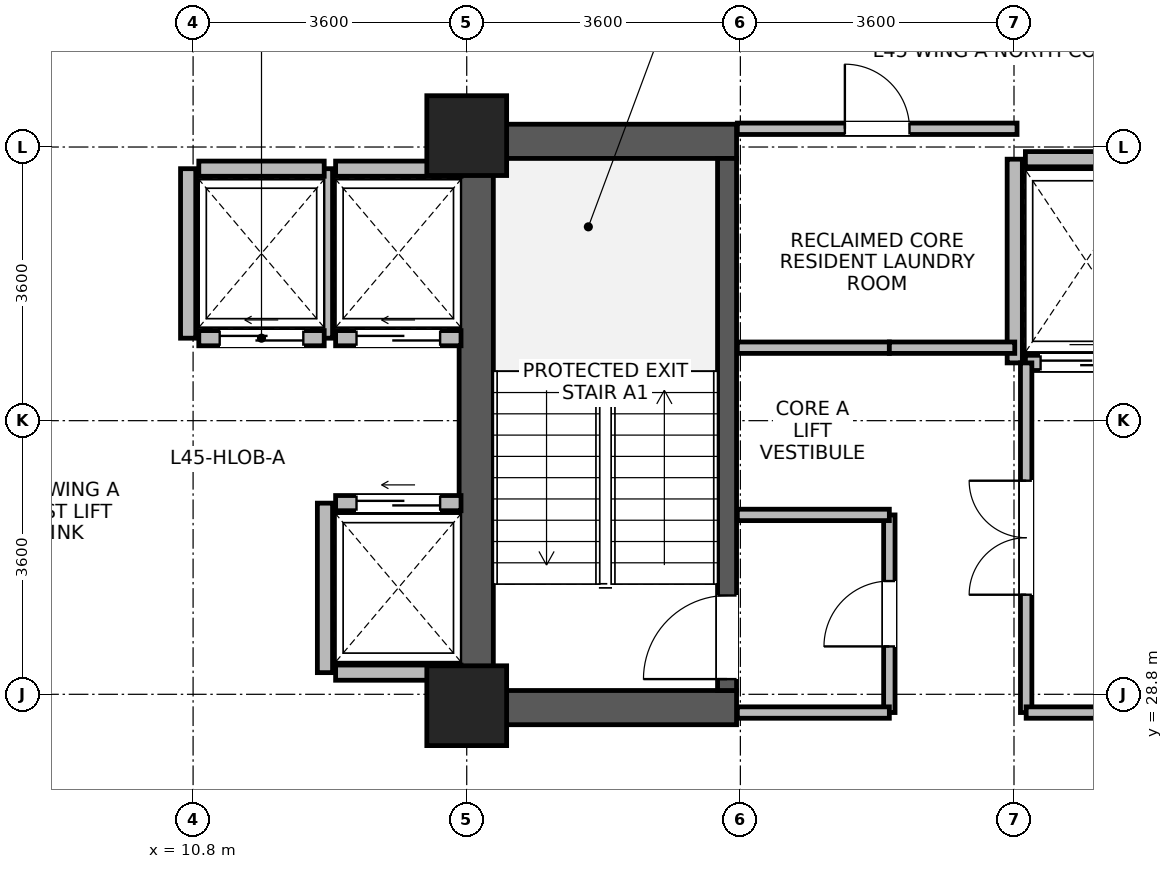
"""IFC4 building model, lengths in metres.
Left out: names, types, materials, properties, quantities, classifications, styles, units other than length and angle.
Written with IfcOpenShell. Run it as: python <this file> out.ifc"""

import sys

from ifc_helpers import new_model, si_unit, direction, frame, frame_2d, origin, origin_2d, place, context, subcontext, project, spatial, rectangle, extrude, source, transform, mapped, element, fill, save


model = new_model("IFC4")
c1 = context("Model", 3, precision=1e-05, world=origin(), true_north=direction((0.0, 1.0)))
c2 = subcontext(c1, "Body", "Model", "MODEL_VIEW")
j1 = project(units=[si_unit("LENGTHUNIT", "METRE"), si_unit("PLANEANGLEUNIT", "RADIAN")], contexts=[c1])
p1 = place(None, origin())
s1 = spatial("IfcSite", under=j1, at=p1, CompositionType="ELEMENT")
p2 = place(p1, origin())
s2 = spatial("IfcBuilding", under=s1, at=p2, CompositionType="ELEMENT")
p3 = place(p2, frame((0.0, 0.0, 177.2)))
s3 = spatial("IfcBuildingStorey", under=s2, at=p3, CompositionType="ELEMENT", Elevation=177.2)
p4 = place(p3, frame((14.525, 28.4, 0.0), z_axis=(0.0, 0.0, 1.0), x_axis=(0.0, 1.0, 0.0)))
e1 = element("IfcWall", 1, at=p4, inside=s3, PredefinedType="SHEAR", context=c2, shape_type="SweptSolid", body=[
    extrude(rectangle(XDim=7.9, YDim=0.45, at=frame_2d((3.95, 0.0))), origin(), (0.0, 0.0, 1.0), 3.46),
])
for number, where, z_axis, x_axis in (
    (2, (14.75, 28.625, 0.0), (0.0, 0.0, 1.0), (1.0, 0.0, 0.0)),
    (3, (14.75, 36.075, 0.0), (0.0, 0.0, 1.0), (1.0, 0.0, 0.0)),
):
    element("IfcWall", number, at=place(p3, frame(where, z_axis=z_axis, x_axis=x_axis)), inside=s3, PredefinedType="SHEAR", context=c2, shape_type="SweptSolid", body=[
        extrude(rectangle(XDim=3.2, YDim=0.45, at=frame_2d((1.6, 0.0))), origin(), (0.0, 0.0, 1.0), 3.46),
    ])
p5 = place(p3, frame((17.825, 28.85, 0.0), z_axis=(0.0, 0.0, 1.0), x_axis=(0.0, 1.0, 0.0)))
e4 = element("IfcWall", 4, at=p5, inside=s3, PredefinedType="SHEAR", context=c2, shape_type="SweptSolid", body=[
    extrude(rectangle(XDim=7.0, YDim=0.25, at=frame_2d((3.5, 0.0))), origin(), (0.0, 0.0, 1.0), 3.46),
])
p6 = place(p5, frame((0.15, 0.0, 0.0)))
e5 = element("IfcOpeningElement", 5, at=p6, cuts=e4, PredefinedType="OPENING", context=c2, shape_type="SweptSolid", body=[
    extrude(rectangle(XDim=1.1, YDim=2.08, at=frame_2d((0.55, 1.04))), frame((0.0, 0.135, 0.0), z_axis=(0.0, -1.0, 0.0), x_axis=(1.0, 0.0, 0.0)), (0.0, 0.0, 1.0), 0.27),
])
m1 = source(origin(), c2, "Body", "SweptSolid", [
    extrude(rectangle(XDim=1.05, YDim=1.05, at=origin_2d()), origin(), (0.0, 0.0, 1.0), 3.7),
])
for number, where, z_axis, x_axis in (
    (6, (14.4, 28.65, 0.0), (0.0, 0.0, 1.0), (1.0, 0.0, 0.0)),
    (7, (14.4, 36.15, 0.0), (0.0, 0.0, 1.0), (1.0, 0.0, 0.0)),
):
    element("IfcColumn", number, at=place(p3, frame(where, z_axis=z_axis, x_axis=x_axis)), inside=s3, PredefinedType="COLUMN", context=c2, shape_type="MappedRepresentation", body=[
        mapped(m1, transform((0.0, 0.0, 0.0), x_axis=(1.0, 0.0, 0.0), y_axis=(0.0, 1.0, 0.0), z_axis=(0.0, 0.0, 1.0), scale=1.0)),
    ])
p7 = place(p3, frame((12.675, 33.485, 0.0), z_axis=(0.0, 0.0, 1.0), x_axis=(1.0, 0.0, 0.0)))
e8 = element("IfcWall", 8, at=p7, inside=s3, PredefinedType="PARTITIONING", context=c2, shape_type="SweptSolid", body=[
    extrude(rectangle(XDim=1.65, YDim=0.2, at=frame_2d((0.825, 0.0))), origin(), (0.0, 0.0, 1.0), 3.44),
])
p8 = place(p7, frame((0.275, 0.0, 0.0)))
e9 = element("IfcOpeningElement", 9, at=p8, cuts=e8, PredefinedType="OPENING", context=c2, shape_type="SweptSolid", body=[
    extrude(rectangle(XDim=1.1, YDim=2.12, at=frame_2d((0.55, 1.06))), frame((0.0, 0.11, 0.0), z_axis=(0.0, -1.0, 0.0), x_axis=(1.0, 0.0, 0.0)), (0.0, 0.0, 1.0), 0.22),
])
p9 = place(p3, frame((12.675, 35.715, 0.0), z_axis=(0.0, 0.0, 1.0), x_axis=(1.0, 0.0, 0.0)))
e10 = element("IfcWall", 10, at=p9, inside=s3, PredefinedType="PARTITIONING", context=c2, shape_type="SweptSolid", body=[
    extrude(rectangle(XDim=1.65, YDim=0.2, at=frame_2d((0.825, 0.0))), origin(), (0.0, 0.0, 1.0), 3.44),
])
p10 = place(p3, frame((12.535, 33.485, 0.0), z_axis=(0.0, 0.0, 1.0), x_axis=(0.0, 1.0, 0.0)))
e11 = element("IfcWall", 11, at=p10, inside=s3, PredefinedType="PARTITIONING", context=c2, shape_type="SweptSolid", body=[
    extrude(rectangle(XDim=2.23, YDim=0.2, at=frame_2d((1.115, 0.0))), origin(), (0.0, 0.0, 1.0), 3.44),
])
p11 = place(p3, frame((12.675, 29.085, 0.0), z_axis=(0.0, 0.0, 1.0), x_axis=(1.0, 0.0, 0.0)))
e12 = element("IfcWall", 12, at=p11, inside=s3, PredefinedType="PARTITIONING", context=c2, shape_type="SweptSolid", body=[
    extrude(rectangle(XDim=1.65, YDim=0.2, at=frame_2d((0.825, 0.0))), origin(), (0.0, 0.0, 1.0), 3.44),
])
p12 = place(p3, frame((12.675, 31.315, 0.0), z_axis=(0.0, 0.0, 1.0), x_axis=(1.0, 0.0, 0.0)))
e13 = element("IfcWall", 13, at=p12, inside=s3, PredefinedType="PARTITIONING", context=c2, shape_type="SweptSolid", body=[
    extrude(rectangle(XDim=1.65, YDim=0.2, at=frame_2d((0.825, 0.0))), origin(), (0.0, 0.0, 1.0), 3.44),
])
p13 = place(p12, frame((0.275, 0.0, 0.0)))
e14 = element("IfcOpeningElement", 14, at=p13, cuts=e13, PredefinedType="OPENING", context=c2, shape_type="SweptSolid", body=[
    extrude(rectangle(XDim=1.1, YDim=2.12, at=frame_2d((0.55, 1.06))), frame((0.0, 0.11, 0.0), z_axis=(0.0, -1.0, 0.0), x_axis=(1.0, 0.0, 0.0)), (0.0, 0.0, 1.0), 0.22),
])
p14 = place(p3, frame((12.535, 29.085, 0.0), z_axis=(0.0, 0.0, 1.0), x_axis=(0.0, 1.0, 0.0)))
e15 = element("IfcWall", 15, at=p14, inside=s3, PredefinedType="PARTITIONING", context=c2, shape_type="SweptSolid", body=[
    extrude(rectangle(XDim=2.23, YDim=0.2, at=frame_2d((1.115, 0.0))), origin(), (0.0, 0.0, 1.0), 3.44),
])
p15 = place(p3, frame((10.875, 33.485, 0.0), z_axis=(0.0, 0.0, 1.0), x_axis=(1.0, 0.0, 0.0)))
e16 = element("IfcWall", 16, at=p15, inside=s3, PredefinedType="PARTITIONING", context=c2, shape_type="SweptSolid", body=[
    extrude(rectangle(XDim=1.65, YDim=0.2, at=frame_2d((0.825, 0.0))), origin(), (0.0, 0.0, 1.0), 3.44),
])
p16 = place(p15, frame((0.275, 0.0, 0.0)))
e17 = element("IfcOpeningElement", 17, at=p16, cuts=e16, PredefinedType="OPENING", context=c2, shape_type="SweptSolid", body=[
    extrude(rectangle(XDim=1.1, YDim=2.12, at=frame_2d((0.55, 1.06))), frame((0.0, 0.11, 0.0), z_axis=(0.0, -1.0, 0.0), x_axis=(1.0, 0.0, 0.0)), (0.0, 0.0, 1.0), 0.22),
])
p17 = place(p3, frame((10.875, 35.715, 0.0), z_axis=(0.0, 0.0, 1.0), x_axis=(1.0, 0.0, 0.0)))
e18 = element("IfcWall", 18, at=p17, inside=s3, PredefinedType="PARTITIONING", context=c2, shape_type="SweptSolid", body=[
    extrude(rectangle(XDim=1.65, YDim=0.2, at=frame_2d((0.825, 0.0))), origin(), (0.0, 0.0, 1.0), 3.44),
])
p18 = place(p3, frame((10.735, 33.485, 0.0), z_axis=(0.0, 0.0, 1.0), x_axis=(0.0, 1.0, 0.0)))
e19 = element("IfcWall", 19, at=p18, inside=s3, PredefinedType="PARTITIONING", context=c2, shape_type="SweptSolid", body=[
    extrude(rectangle(XDim=2.23, YDim=0.2, at=frame_2d((1.115, 0.0))), origin(), (0.0, 0.0, 1.0), 3.44),
])
p19 = place(p3, frame((21.75, 33.16, 0.0), z_axis=(0.0, 0.0, 1.0), x_axis=(1.0, 0.0, 0.0)))
e20 = element("IfcWall", 20, at=p19, inside=s3, PredefinedType="PARTITIONING", context=c2, shape_type="SweptSolid", body=[
    extrude(rectangle(XDim=1.6, YDim=0.2, at=frame_2d((0.8, 0.0))), origin(), (0.0, 0.0, 1.0), 3.44),
])
p20 = place(p19, frame((0.2, 0.0, 0.0)))
e21 = element("IfcOpeningElement", 21, at=p20, cuts=e20, PredefinedType="OPENING", context=c2, shape_type="SweptSolid", body=[
    extrude(rectangle(XDim=1.2, YDim=2.12, at=frame_2d((0.6, 1.06))), frame((0.0, 0.11, 0.0), z_axis=(0.0, -1.0, 0.0), x_axis=(1.0, 0.0, 0.0)), (0.0, 0.0, 1.0), 0.22),
])
p21 = place(p3, frame((21.75, 35.84, 0.0), z_axis=(0.0, 0.0, 1.0), x_axis=(1.0, 0.0, 0.0)))
e22 = element("IfcWall", 22, at=p21, inside=s3, PredefinedType="PARTITIONING", context=c2, shape_type="SweptSolid", body=[
    extrude(rectangle(XDim=1.6, YDim=0.2, at=frame_2d((0.8, 0.0))), origin(), (0.0, 0.0, 1.0), 2.44),
])
p22 = place(p3, frame((21.61, 33.16, 0.0), z_axis=(0.0, 0.0, 1.0), x_axis=(0.0, 1.0, 0.0)))
e23 = element("IfcWall", 23, at=p22, inside=s3, PredefinedType="PARTITIONING", context=c2, shape_type="SweptSolid", body=[
    extrude(rectangle(XDim=2.68, YDim=0.2, at=frame_2d((1.34, 0.0))), origin(), (0.0, 0.0, 1.0), 3.44),
])
p23 = place(p3, frame((17.96, 36.24, 0.0), z_axis=(0.0, 0.0, 1.0), x_axis=(1.0, 0.0, 0.0)))
e24 = element("IfcWall", 24, at=p23, inside=s3, PredefinedType="PARTITIONING", context=c2, shape_type="SweptSolid", body=[
    extrude(rectangle(XDim=3.68, YDim=0.15, at=frame_2d((1.84, 0.0))), origin(), (0.0, 0.0, 1.0), 2.44),
])
p24 = place(p23, frame((1.415, 0.0, 0.0)))
e25 = element("IfcOpeningElement", 25, at=p24, cuts=e24, PredefinedType="OPENING", context=c2, shape_type="SweptSolid", body=[
    extrude(rectangle(XDim=0.85, YDim=2.04, at=frame_2d((0.425, 1.02))), frame((0.0, 0.085, 0.0), z_axis=(0.0, -1.0, 0.0), x_axis=(1.0, 0.0, 0.0)), (0.0, 0.0, 1.0), 0.17),
])
p25 = place(p3, frame((19.96, 28.56, 0.0), z_axis=(0.0, 0.0, 1.0), x_axis=(0.0, 1.0, 0.0)))
e26 = element("IfcWall", 26, at=p25, inside=s3, PredefinedType="PARTITIONING", context=c2, shape_type="SweptSolid", body=[
    extrude(rectangle(XDim=2.6, YDim=0.15, at=frame_2d((1.3, 0.0))), origin(), (0.0, 0.0, 1.0), 3.44),
])
p26 = place(p25, frame((0.87, 0.0, 0.0)))
e27 = element("IfcOpeningElement", 27, at=p26, cuts=e26, PredefinedType="OPENING", context=c2, shape_type="SweptSolid", body=[
    extrude(rectangle(XDim=0.86, YDim=2.02, at=frame_2d((0.43, 1.01))), frame((0.0, 0.085, 0.0), z_axis=(0.0, -1.0, 0.0), x_axis=(1.0, 0.0, 0.0)), (0.0, 0.0, 1.0), 0.17),
])
p27 = place(p3, frame((17.96, 28.56, 0.0), z_axis=(0.0, 0.0, 1.0), x_axis=(1.0, 0.0, 0.0)))
e28 = element("IfcWall", 28, at=p27, inside=s3, PredefinedType="PARTITIONING", context=c2, shape_type="SweptSolid", body=[
    extrude(rectangle(XDim=2.0, YDim=0.15, at=frame_2d((1.0, 0.0))), origin(), (0.0, 0.0, 1.0), 2.44),
])
for number, where, z_axis, x_axis in (
    (29, (17.96, 31.16, 0.0), (0.0, 0.0, 1.0), (1.0, 0.0, 0.0)),
    (30, (17.96, 33.36, 0.0), (0.0, 0.0, 1.0), (1.0, 0.0, 0.0)),
):
    element("IfcWall", number, at=place(p3, frame(where, z_axis=z_axis, x_axis=x_axis)), inside=s3, PredefinedType="PARTITIONING", context=c2, shape_type="SweptSolid", body=[
        extrude(rectangle(XDim=2.0, YDim=0.15, at=frame_2d((1.0, 0.0))), origin(), (0.0, 0.0, 1.0), 3.44),
    ])
p28 = place(p3, frame((19.96, 33.36, 0.0), z_axis=(0.0, 0.0, 1.0), x_axis=(1.0, 0.0, 0.0)))
e31 = element("IfcWall", 31, at=p28, inside=s3, PredefinedType="PARTITIONING", context=c2, shape_type="SweptSolid", body=[
    extrude(rectangle(XDim=1.65, YDim=0.15, at=frame_2d((0.825, 0.0))), origin(), (0.0, 0.0, 1.0), 3.44),
])
p29 = place(p3, frame((21.76, 28.56, 0.0), z_axis=(0.0, 0.0, 1.0), x_axis=(0.0, 1.0, 0.0)))
e32 = element("IfcWall", 32, at=p29, inside=s3, PredefinedType="PARTITIONING", context=c2, shape_type="SweptSolid", body=[
    extrude(rectangle(XDim=4.6, YDim=0.15, at=frame_2d((2.3, 0.0))), origin(), (0.0, 0.0, 1.0), 3.44),
])
p30 = place(p29, frame((1.55, 0.0, 0.0)))
e33 = element("IfcOpeningElement", 33, at=p30, cuts=e32, PredefinedType="OPENING", context=c2, shape_type="SweptSolid", body=[
    extrude(rectangle(XDim=1.5, YDim=2.1, at=frame_2d((0.75, 1.05))), frame((0.0, 0.085, 0.0), z_axis=(0.0, -1.0, 0.0), x_axis=(1.0, 0.0, 0.0)), (0.0, 0.0, 1.0), 0.17),
])
p31 = place(p3, frame((21.76, 28.56, 0.0), z_axis=(0.0, 0.0, 1.0), x_axis=(1.0, 0.0, 0.0)))
e34 = element("IfcWall", 34, at=p31, inside=s3, PredefinedType="PARTITIONING", context=c2, shape_type="SweptSolid", body=[
    extrude(rectangle(XDim=3.48, YDim=0.15, at=frame_2d((1.74, 0.0))), origin(), (0.0, 0.0, 1.0), 2.44),
])
p32 = place(p6, origin())
e35 = element("IfcDoor", 35, at=p32, inside=s3, OperationType="SINGLE_SWING_LEFT", PredefinedType="DOOR", context=c2, shape_type="SweptSolid", body=[
    extrude(rectangle(XDim=1.1, YDim=2.08, at=frame_2d((0.55, 1.04))), frame((0.0, 0.025, 0.0), z_axis=(0.0, -1.0, 0.0), x_axis=(1.0, 0.0, 0.0)), (0.0, 0.0, 1.0), 0.05),
])
fill(e5, e35)
p33 = place(p8, origin())
e36 = element("IfcDoor", 36, at=p33, inside=s3, OperationType="SLIDING_TO_LEFT", PredefinedType="DOOR", context=c2, shape_type="SweptSolid", body=[
    extrude(rectangle(XDim=1.1, YDim=2.12, at=frame_2d((0.55, 1.06))), frame((0.0, 0.025, 0.0), z_axis=(0.0, -1.0, 0.0), x_axis=(1.0, 0.0, 0.0)), (0.0, 0.0, 1.0), 0.05),
])
fill(e9, e36)
p34 = place(p13, origin())
e37 = element("IfcDoor", 37, at=p34, inside=s3, OperationType="SLIDING_TO_LEFT", PredefinedType="DOOR", context=c2, shape_type="SweptSolid", body=[
    extrude(rectangle(XDim=1.1, YDim=2.12, at=frame_2d((0.55, 1.06))), frame((0.0, 0.025, 0.0), z_axis=(0.0, -1.0, 0.0), x_axis=(1.0, 0.0, 0.0)), (0.0, 0.0, 1.0), 0.05),
])
fill(e14, e37)
p35 = place(p16, origin())
e38 = element("IfcDoor", 38, at=p35, inside=s3, OperationType="SLIDING_TO_LEFT", PredefinedType="DOOR", context=c2, shape_type="SweptSolid", body=[
    extrude(rectangle(XDim=1.1, YDim=2.12, at=frame_2d((0.55, 1.06))), frame((0.0, 0.025, 0.0), z_axis=(0.0, -1.0, 0.0), x_axis=(1.0, 0.0, 0.0)), (0.0, 0.0, 1.0), 0.05),
])
fill(e17, e38)
p36 = place(p20, origin())
e39 = element("IfcDoor", 39, at=p36, inside=s3, OperationType="SLIDING_TO_RIGHT", PredefinedType="DOOR", context=c2, shape_type="SweptSolid", body=[
    extrude(rectangle(XDim=1.2, YDim=2.12, at=frame_2d((0.6, 1.06))), frame((0.0, 0.025, 0.0), z_axis=(0.0, -1.0, 0.0), x_axis=(1.0, 0.0, 0.0)), (0.0, 0.0, 1.0), 0.05),
])
fill(e21, e39)
p37 = place(p24, origin())
e40 = element("IfcDoor", 40, at=p37, inside=s3, OperationType="SINGLE_SWING_LEFT", PredefinedType="DOOR", context=c2, shape_type="SweptSolid", body=[
    extrude(rectangle(XDim=0.85, YDim=2.04, at=frame_2d((0.425, 1.02))), frame((0.0, 0.025, 0.0), z_axis=(0.0, -1.0, 0.0), x_axis=(1.0, 0.0, 0.0)), (0.0, 0.0, 1.0), 0.05),
])
fill(e25, e40)
p38 = place(p26, origin())
e41 = element("IfcDoor", 41, at=p38, inside=s3, OperationType="SINGLE_SWING_LEFT", PredefinedType="DOOR", context=c2, shape_type="SweptSolid", body=[
    extrude(rectangle(XDim=0.86, YDim=2.02, at=frame_2d((0.43, 1.01))), frame((0.0, 0.025, 0.0), z_axis=(0.0, -1.0, 0.0), x_axis=(1.0, 0.0, 0.0)), (0.0, 0.0, 1.0), 0.05),
])
fill(e27, e41)
p39 = place(p30, origin())
e42 = element("IfcDoor", 42, at=p39, inside=s3, OperationType="DOUBLE_DOOR_SINGLE_SWING", PredefinedType="DOOR", context=c2, shape_type="SweptSolid", body=[
    extrude(rectangle(XDim=1.5, YDim=2.1, at=frame_2d((0.75, 1.05))), frame((0.0, 0.025, 0.0), z_axis=(0.0, -1.0, 0.0), x_axis=(1.0, 0.0, 0.0)), (0.0, 0.0, 1.0), 0.05),
])
fill(e33, e42)
save(model, sys.argv[1])
